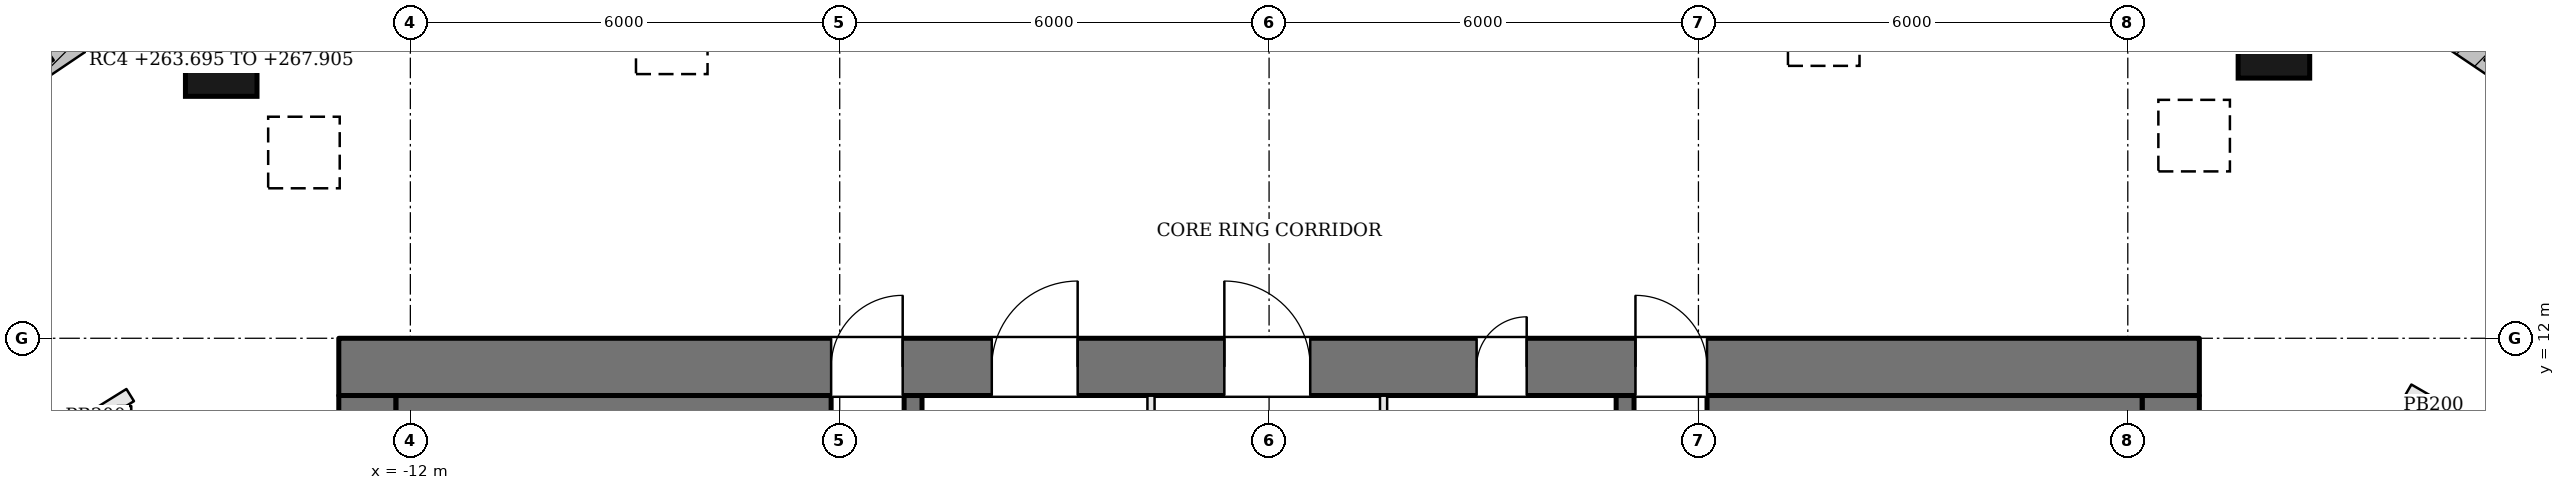
"""IFC4 building model, lengths in metres.
Left out: names, types, materials, properties, quantities, classifications, styles, units other than length and angle.
Written with IfcOpenShell. Run it as: python <this file> out.ifc"""

import sys

from ifc_helpers import new_model, si_unit, direction, frame, frame_2d, origin, origin_2d, place, context, subcontext, project, spatial, rectangle, extrude, element, fill, save


model = new_model("IFC4")
c1 = context("Model", 3, precision=1e-05, world=origin(), true_north=direction((0.0, 1.0)))
c2 = subcontext(c1, "Body", "Model", "MODEL_VIEW")
j1 = project(units=[si_unit("LENGTHUNIT", "METRE"), si_unit("PLANEANGLEUNIT", "RADIAN")], contexts=[c1])
p1 = place(None, origin())
s1 = spatial("IfcSite", under=j1, at=p1, CompositionType="ELEMENT")
p2 = place(p1, origin())
s2 = spatial("IfcBuilding", under=s1, at=p2, CompositionType="ELEMENT")
p3 = place(p2, frame((0.0, 0.0, 264.3)))
s3 = spatial("IfcBuildingStorey", under=s2, at=p3, CompositionType="ELEMENT", Elevation=264.3)
p4 = place(p3, frame((-13.0, 11.6, 0.0), z_axis=(0.0, 0.0, 1.0), x_axis=(1.0, 0.0, 0.0)))
e1 = element("IfcWall", 1, at=p4, inside=s3, PredefinedType="SHEAR", context=c2, shape_type="SweptSolid", body=[
    extrude(rectangle(XDim=26.0, YDim=0.8, at=frame_2d((13.0, 0.0))), origin(), (0.0, 0.0, 1.0), 4.5),
])
p5 = place(p4, frame((9.125, 0.0, 0.0)))
e2 = element("IfcOpeningElement", 2, at=p5, cuts=e1, PredefinedType="OPENING", context=c2, shape_type="SweptSolid", body=[
    extrude(rectangle(XDim=1.2, YDim=2.1, at=frame_2d((0.6, 1.05))), frame((0.0, 0.41, 0.0), z_axis=(0.0, -1.0, 0.0), x_axis=(1.0, 0.0, 0.0)), (0.0, 0.0, 1.0), 0.82),
])
p6 = place(p4, frame((12.375, 0.0, 0.0)))
e3 = element("IfcOpeningElement", 3, at=p6, cuts=e1, PredefinedType="OPENING", context=c2, shape_type="SweptSolid", body=[
    extrude(rectangle(XDim=1.2, YDim=2.1, at=frame_2d((0.6, 1.05))), frame((0.0, 0.41, 0.0), z_axis=(0.0, -1.0, 0.0), x_axis=(1.0, 0.0, 0.0)), (0.0, 0.0, 1.0), 0.82),
])
p7 = place(p4, frame((15.9, 0.0, 0.0)))
e4 = element("IfcOpeningElement", 4, at=p7, cuts=e1, PredefinedType="OPENING", context=c2, shape_type="SweptSolid", body=[
    extrude(rectangle(XDim=0.7, YDim=2.1, at=frame_2d((0.35, 1.05))), frame((0.0, 0.41, 0.0), z_axis=(0.0, -1.0, 0.0), x_axis=(1.0, 0.0, 0.0)), (0.0, 0.0, 1.0), 0.82),
])
p8 = place(p4, frame((6.88, 0.0, 0.0)))
e5 = element("IfcOpeningElement", 5, at=p8, cuts=e1, PredefinedType="OPENING", context=c2, shape_type="SweptSolid", body=[
    extrude(rectangle(XDim=1.0, YDim=2.1, at=frame_2d((0.5, 1.05))), frame((0.0, 0.41, 0.0), z_axis=(0.0, -1.0, 0.0), x_axis=(1.0, 0.0, 0.0)), (0.0, 0.0, 1.0), 0.82),
])
p9 = place(p4, frame((18.12, 0.0, 0.0)))
e6 = element("IfcOpeningElement", 6, at=p9, cuts=e1, PredefinedType="OPENING", context=c2, shape_type="SweptSolid", body=[
    extrude(rectangle(XDim=1.0, YDim=2.1, at=frame_2d((0.5, 1.05))), frame((0.0, 0.41, 0.0), z_axis=(0.0, -1.0, 0.0), x_axis=(1.0, 0.0, 0.0)), (0.0, 0.0, 1.0), 0.82),
])
p10 = place(p3, frame((12.6, -2.2, 0.0), z_axis=(0.0, 0.0, 1.0), x_axis=(0.0, 1.0, 0.0)))
e7 = element("IfcWall", 7, at=p10, inside=s3, PredefinedType="SHEAR", context=c2, shape_type="SweptSolid", body=[
    extrude(rectangle(XDim=13.4, YDim=0.8, at=frame_2d((6.7, 0.0))), origin(), (0.0, 0.0, 1.0), 4.5),
])
p11 = place(p10, frame((7.4, 0.0, 0.0)))
e8 = element("IfcOpeningElement", 8, at=p11, cuts=e7, PredefinedType="OPENING", context=c2, shape_type="SweptSolid", body=[
    extrude(rectangle(XDim=1.8, YDim=2.1, at=frame_2d((0.9, 1.05))), frame((0.0, 0.41, 0.0), z_axis=(0.0, -1.0, 0.0), x_axis=(1.0, 0.0, 0.0)), (0.0, 0.0, 1.0), 0.82),
])
p12 = place(p3, frame((-12.6, -2.2, 0.0), z_axis=(0.0, 0.0, 1.0), x_axis=(0.0, 1.0, 0.0)))
e9 = element("IfcWall", 9, at=p12, inside=s3, PredefinedType="SHEAR", context=c2, shape_type="SweptSolid", body=[
    extrude(rectangle(XDim=13.4, YDim=0.8, at=frame_2d((6.7, 0.0))), origin(), (0.0, 0.0, 1.0), 4.5),
])
p13 = place(p12, frame((4.2, 0.0, 0.0)))
e10 = element("IfcOpeningElement", 10, at=p13, cuts=e9, PredefinedType="OPENING", context=c2, shape_type="SweptSolid", body=[
    extrude(rectangle(XDim=1.8, YDim=2.1, at=frame_2d((0.9, 1.05))), frame((0.0, 0.41, 0.0), z_axis=(0.0, -1.0, 0.0), x_axis=(1.0, 0.0, 0.0)), (0.0, 0.0, 1.0), 0.82),
])
p14 = place(p3, frame((19.092, 13.209, -0.594), z_axis=(-0.329610632582, -0.231266388475, 0.915353859691), x_axis=(0.574360318683, -0.818602604639, 0.0)))
e11 = element("IfcColumn", 11, at=p14, inside=s3, PredefinedType="COLUMN", context=c2, shape_type="SweptSolid", body=[
    extrude(rectangle(XDim=1.0, YDim=1.0, at=origin_2d()), origin(), (0.0, 0.0, 1.0), 4.575),
])
p15 = place(p3, frame((14.042, 16.136, -0.606), z_axis=(-0.245164009976, -0.286713592573, 0.926115502541), x_axis=(0.760029513811, -0.649888558243, 0.0)))
e12 = element("IfcColumn", 12, at=p15, inside=s3, PredefinedType="COLUMN", context=c2, shape_type="SweptSolid", body=[
    extrude(rectangle(XDim=1.0, YDim=1.0, at=origin_2d()), origin(), (0.0, 0.0, 1.0), 4.548),
])
p16 = place(p3, frame((8.422, 17.749, -0.619), z_axis=(-0.148262587168, -0.318583885924, 0.936227810352), x_axis=(0.906629641713, -0.421927354845, 0.0)))
e13 = element("IfcColumn", 13, at=p16, inside=s3, PredefinedType="COLUMN", context=c2, shape_type="SweptSolid", body=[
    extrude(rectangle(XDim=1.0, YDim=1.0, at=origin_2d()), origin(), (0.0, 0.0, 1.0), 4.527),
])
p17 = place(p3, frame((-9.063, 17.625, -0.618), z_axis=(0.158109970508, -0.316435570024, 0.93534473177), x_axis=(0.89454907246, 0.446969749493, 0.0)))
e14 = element("IfcColumn", 14, at=p17, inside=s3, PredefinedType="COLUMN", context=c2, shape_type="SweptSolid", body=[
    extrude(rectangle(XDim=1.0, YDim=1.0, at=origin_2d()), origin(), (0.0, 0.0, 1.0), 4.529),
])
p18 = place(p3, frame((-14.643, 15.881, -0.605), z_axis=(0.254010498473, -0.282388862505, 0.925059564027), x_axis=(0.743476713513, 0.66876182342, 0.0)))
e15 = element("IfcColumn", 15, at=p18, inside=s3, PredefinedType="COLUMN", context=c2, shape_type="SweptSolid", body=[
    extrude(rectangle(XDim=1.0, YDim=1.0, at=origin_2d()), origin(), (0.0, 0.0, 1.0), 4.551),
])
p19 = place(p3, frame((19.647, 14.179, 0.0), z_axis=(0.0, 0.0, 1.0), x_axis=(-0.829039015156, 0.559190764721, 0.0)))
e16 = element("IfcWall", 16, at=p19, inside=s3, PredefinedType="SOLIDWALL", context=c2, shape_type="SweptSolid", body=[
    extrude(rectangle(XDim=3.895, YDim=0.45, at=frame_2d((1.947, 0.0))), origin(), (0.0, 0.0, 1.0), 4.3),
])
p20 = place(p19, frame((0.897, 0.0, 1.2)))
e17 = element("IfcOpeningElement", 17, at=p20, cuts=e16, PredefinedType="OPENING", context=c2, shape_type="SweptSolid", body=[
    extrude(rectangle(XDim=2.1, YDim=1.8, at=frame_2d((1.05, 0.9))), frame((0.0, 0.235, 0.0), z_axis=(0.0, -1.0, 0.0), x_axis=(1.0, 0.0, 0.0)), (0.0, 0.0, 1.0), 0.47),
])
p21 = place(p3, frame((-16.418, 16.357, 0.0), z_axis=(0.0, 0.0, 1.0), x_axis=(-0.829039015156, -0.559190764721, 0.0)))
e18 = element("IfcWall", 18, at=p21, inside=s3, PredefinedType="SOLIDWALL", context=c2, shape_type="SweptSolid", body=[
    extrude(rectangle(XDim=3.895, YDim=0.45, at=frame_2d((1.947, 0.0))), origin(), (0.0, 0.0, 1.0), 4.3),
])
p22 = place(p21, frame((0.897, 0.0, 1.2)))
e19 = element("IfcOpeningElement", 19, at=p22, cuts=e18, PredefinedType="OPENING", context=c2, shape_type="SweptSolid", body=[
    extrude(rectangle(XDim=2.1, YDim=1.8, at=frame_2d((1.05, 0.9))), frame((0.0, 0.235, 0.0), z_axis=(0.0, -1.0, 0.0), x_axis=(1.0, 0.0, 0.0)), (0.0, 0.0, 1.0), 0.47),
])
for number, where, z_axis, x_axis in (
    (20, (19.638, 14.276, 4.5), (0.0, 0.0, 1.0), (-0.829, 0.559, 0.0)),
    (21, (-17.067, 16.01, 4.5), (0.0, 0.0, 1.0), (-0.829, -0.559, 0.0)),
):
    element("IfcWall", number, at=place(p3, frame(where, z_axis=z_axis, x_axis=x_axis)), inside=s3, PredefinedType="PARAPET", context=c2, shape_type="SweptSolid", body=[
        extrude(rectangle(XDim=3.101, YDim=0.3, at=frame_2d((1.55, 0.0))), origin(), (0.0, 0.0, 1.0), 1.1),
    ])
p23 = place(p3, frame((-4.975, -2.2, 0.0), z_axis=(0.0, 0.0, 1.0), x_axis=(0.0, 1.0, 0.0)))
e22 = element("IfcWall", 22, at=p23, inside=s3, PredefinedType="SOLIDWALL", context=c2, shape_type="SweptSolid", body=[
    extrude(rectangle(XDim=13.4, YDim=0.25, at=frame_2d((6.7, 0.0))), origin(), (0.0, 0.0, 1.0), 4.3),
])
p24 = place(p23, frame((5.25, 0.0, 0.0)))
e23 = element("IfcOpeningElement", 23, at=p24, cuts=e22, PredefinedType="OPENING", context=c2, shape_type="SweptSolid", body=[
    extrude(rectangle(XDim=1.2, YDim=2.1, at=frame_2d((0.6, 1.05))), frame((0.0, 0.135, 0.0), z_axis=(0.0, -1.0, 0.0), x_axis=(1.0, 0.0, 0.0)), (0.0, 0.0, 1.0), 0.27),
])
p25 = place(p3, frame((4.975, 11.2, 0.0), z_axis=(0.0, 0.0, 1.0), x_axis=(0.0, -1.0, 0.0)))
e24 = element("IfcWall", 24, at=p25, inside=s3, PredefinedType="SOLIDWALL", context=c2, shape_type="SweptSolid", body=[
    extrude(rectangle(XDim=13.4, YDim=0.25, at=frame_2d((6.7, 0.0))), origin(), (0.0, 0.0, 1.0), 4.3),
])
p26 = place(p25, frame((5.25, 0.0, 0.0)))
e25 = element("IfcOpeningElement", 25, at=p26, cuts=e24, PredefinedType="OPENING", context=c2, shape_type="SweptSolid", body=[
    extrude(rectangle(XDim=1.2, YDim=2.1, at=frame_2d((0.6, 1.05))), frame((0.0, 0.135, 0.0), z_axis=(0.0, -1.0, 0.0), x_axis=(1.0, 0.0, 0.0)), (0.0, 0.0, 1.0), 0.27),
])
for number, where, z_axis, x_axis in (
    (26, (-12.2, 10.9, 0.0), (0.0, 0.0, 1.0), (1.0, 0.0, 0.0)),
    (27, (12.2, 10.9, 0.0), (0.0, 0.0, 1.0), (-1.0, 0.0, 0.0)),
):
    element("IfcWall", number, at=place(p3, frame(where, z_axis=z_axis, x_axis=x_axis)), inside=s3, PredefinedType="SOLIDWALL", context=c2, shape_type="SweptSolid", body=[
        extrude(rectangle(XDim=6.08, YDim=0.6, at=frame_2d((3.04, 0.0))), origin(), (0.0, 0.0, 1.0), 4.3),
    ])
for number, where, z_axis, x_axis in (
    (28, (-1.65, 8.6, 0.0), (0.0, 0.0, 1.0), (0.0, 1.0, 0.0)),
    (29, (1.6, 8.6, 0.0), (0.0, 0.0, 1.0), (0.0, 1.0, 0.0)),
):
    element("IfcWall", number, at=place(p3, frame(where, z_axis=z_axis, x_axis=x_axis)), inside=s3, PredefinedType="PARTITIONING", context=c2, shape_type="SweptSolid", body=[
        extrude(rectangle(XDim=2.6, YDim=0.1, at=frame_2d((1.3, 0.0))), origin(), (0.0, 0.0, 1.0), 4.3),
    ])
p27 = place(p3, frame((-16.883, 10.605, 0.0), z_axis=(0.0, 0.0, 1.0), x_axis=(0.84954745962, 0.527512193085, 0.0)))
e30 = element("IfcWall", 30, at=p27, inside=s3, PredefinedType="PARTITIONING", context=c2, shape_type="SweptSolid", body=[
    extrude(rectangle(XDim=1.139, YDim=0.2, at=frame_2d((0.57, 0.0))), origin(), (0.0, 0.0, 1.0), 4.3),
])
p28 = place(p3, frame((-16.0, 11.053, 0.0), z_axis=(0.0, 0.0, 1.0), x_axis=(0.0, -1.0, 0.0)))
e31 = element("IfcWall", 31, at=p28, inside=s3, PredefinedType="PARTITIONING", context=c2, shape_type="SweptSolid", body=[
    extrude(rectangle(XDim=16.953, YDim=0.2, at=frame_2d((8.477, 0.0))), origin(), (0.0, 0.0, 1.0), 4.3),
])
p29 = place(p28, frame((6.077, 0.0, 0.0)))
e32 = element("IfcOpeningElement", 32, at=p29, cuts=e31, PredefinedType="OPENING", context=c2, shape_type="SweptSolid", body=[
    extrude(rectangle(XDim=1.8, YDim=2.1, at=frame_2d((0.9, 1.05))), frame((0.0, 0.11, 0.0), z_axis=(0.0, -1.0, 0.0), x_axis=(1.0, 0.0, 0.0)), (0.0, 0.0, 1.0), 0.22),
])
p30 = place(p3, frame((15.913, 11.267, 0.0), z_axis=(0.0, 0.0, 1.0), x_axis=(0.866219676164, -0.4996633593, 0.0)))
e33 = element("IfcWall", 33, at=p30, inside=s3, PredefinedType="PARTITIONING", context=c2, shape_type="SweptSolid", body=[
    extrude(rectangle(XDim=0.834, YDim=0.2, at=frame_2d((0.417, 0.0))), origin(), (0.0, 0.0, 1.0), 4.3),
])
p31 = place(p3, frame((16.0, -5.9, 0.0), z_axis=(0.0, 0.0, 1.0), x_axis=(0.0, 1.0, 0.0)))
e34 = element("IfcWall", 34, at=p31, inside=s3, PredefinedType="PARTITIONING", context=c2, shape_type="SweptSolid", body=[
    extrude(rectangle(XDim=17.017, YDim=0.2, at=frame_2d((8.508, 0.0))), origin(), (0.0, 0.0, 1.0), 4.3),
])
p32 = place(p31, frame((9.108, 0.0, 0.0)))
e35 = element("IfcOpeningElement", 35, at=p32, cuts=e34, PredefinedType="OPENING", context=c2, shape_type="SweptSolid", body=[
    extrude(rectangle(XDim=1.8, YDim=2.1, at=frame_2d((0.9, 1.05))), frame((0.0, 0.11, 0.0), z_axis=(0.0, -1.0, 0.0), x_axis=(1.0, 0.0, 0.0)), (0.0, 0.0, 1.0), 0.22),
])
p33 = place(p5, origin())
e36 = element("IfcDoor", 36, at=p33, inside=s3, OperationType="SINGLE_SWING_RIGHT", PredefinedType="DOOR", context=c2, shape_type="SweptSolid", body=[
    extrude(rectangle(XDim=1.2, YDim=2.1, at=frame_2d((0.6, 1.05))), frame((0.0, 0.025, 0.0), z_axis=(0.0, -1.0, 0.0), x_axis=(1.0, 0.0, 0.0)), (0.0, 0.0, 1.0), 0.05),
])
fill(e2, e36)
p34 = place(p6, origin())
e37 = element("IfcDoor", 37, at=p34, inside=s3, OperationType="SINGLE_SWING_LEFT", PredefinedType="DOOR", context=c2, shape_type="SweptSolid", body=[
    extrude(rectangle(XDim=1.2, YDim=2.1, at=frame_2d((0.6, 1.05))), frame((0.0, 0.025, 0.0), z_axis=(0.0, -1.0, 0.0), x_axis=(1.0, 0.0, 0.0)), (0.0, 0.0, 1.0), 0.05),
])
fill(e3, e37)
p35 = place(p7, origin())
e38 = element("IfcDoor", 38, at=p35, inside=s3, OperationType="SINGLE_SWING_RIGHT", PredefinedType="DOOR", context=c2, shape_type="SweptSolid", body=[
    extrude(rectangle(XDim=0.7, YDim=2.1, at=frame_2d((0.35, 1.05))), frame((0.0, 0.025, 0.0), z_axis=(0.0, -1.0, 0.0), x_axis=(1.0, 0.0, 0.0)), (0.0, 0.0, 1.0), 0.05),
])
fill(e4, e38)
p36 = place(p8, origin())
e39 = element("IfcDoor", 39, at=p36, inside=s3, OperationType="SINGLE_SWING_RIGHT", PredefinedType="DOOR", context=c2, shape_type="SweptSolid", body=[
    extrude(rectangle(XDim=1.0, YDim=2.1, at=frame_2d((0.5, 1.05))), frame((0.0, 0.025, 0.0), z_axis=(0.0, -1.0, 0.0), x_axis=(1.0, 0.0, 0.0)), (0.0, 0.0, 1.0), 0.05),
])
fill(e5, e39)
p37 = place(p9, origin())
e40 = element("IfcDoor", 40, at=p37, inside=s3, OperationType="SINGLE_SWING_LEFT", PredefinedType="DOOR", context=c2, shape_type="SweptSolid", body=[
    extrude(rectangle(XDim=1.0, YDim=2.1, at=frame_2d((0.5, 1.05))), frame((0.0, 0.025, 0.0), z_axis=(0.0, -1.0, 0.0), x_axis=(1.0, 0.0, 0.0)), (0.0, 0.0, 1.0), 0.05),
])
fill(e6, e40)
save(model, sys.argv[1])
